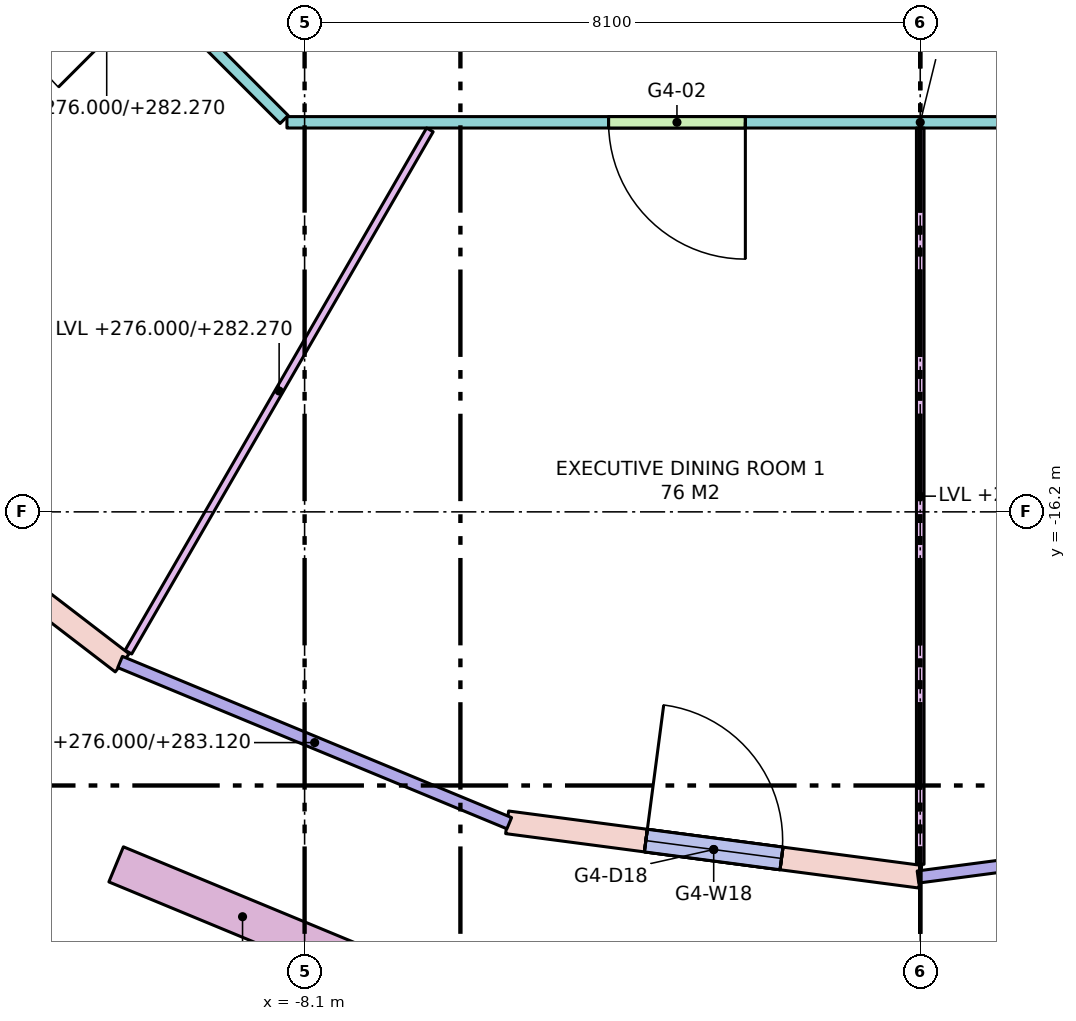
"""IFC4 building model, lengths in metres.
Left out: names, types, materials, properties, quantities, classifications, styles, units other than length and angle.
Written with IfcOpenShell. Run it as: python <this file> out.ifc"""

import sys

from ifc_helpers import new_model, si_unit, direction, frame, frame_2d, origin, place, context, subcontext, project, spatial, rectangle, extrude, element, fill, save


model = new_model("IFC4")
c1 = context("Model", 3, precision=1e-05, world=origin(), true_north=direction((0.0, 1.0)))
c2 = subcontext(c1, "Body", "Model", "MODEL_VIEW")
j1 = project(units=[si_unit("LENGTHUNIT", "METRE"), si_unit("PLANEANGLEUNIT", "RADIAN")], contexts=[c1])
p1 = place(None, origin())
s1 = spatial("IfcSite", under=j1, at=p1, CompositionType="ELEMENT")
p2 = place(p1, origin())
s2 = spatial("IfcBuilding", under=s1, at=p2, CompositionType="ELEMENT")
p3 = place(p2, frame((0.0, 0.0, 276.0)))
s3 = spatial("IfcBuildingStorey", under=s2, at=p3, CompositionType="ELEMENT", Elevation=276.0)
p4 = place(p3, frame((-14.849, -14.849, 0.0), z_axis=(0.0, 0.0, 1.0), x_axis=(0.793335336593, -0.608784891166, 0.0)))
e1 = element("IfcWall", 1, at=p4, inside=s3, PredefinedType="STANDARD", context=c2, shape_type="SweptSolid", body=[
    extrude(rectangle(XDim=5.482, YDim=0.3, at=frame_2d((2.741, 0.0))), origin(), (0.0, 0.0, 1.0), 7.12),
])
p5 = place(p4, frame((1.841, 0.0, 0.0)))
e2 = element("IfcOpeningElement", 2, at=p5, cuts=e1, PredefinedType="OPENING", context=c2, shape_type="SweptSolid", body=[
    extrude(rectangle(XDim=1.8, YDim=2.4, at=frame_2d((0.9, 1.2))), frame((0.0, 0.16, 0.0), z_axis=(0.0, -1.0, 0.0), x_axis=(1.0, 0.0, 0.0)), (0.0, 0.0, 1.0), 0.32),
])
p6 = place(p4, frame((1.841, 0.0, 2.8)))
e3 = element("IfcOpeningElement", 3, at=p6, cuts=e1, PredefinedType="OPENING", context=c2, shape_type="SweptSolid", body=[
    extrude(rectangle(XDim=1.8, YDim=4.1, at=frame_2d((0.9, 2.05))), frame((0.0, 0.16, 0.0), z_axis=(0.0, -1.0, 0.0), x_axis=(1.0, 0.0, 0.0)), (0.0, 0.0, 1.0), 0.32),
])
p7 = place(p3, frame((-5.435, -20.284, 0.0), z_axis=(0.0, 0.0, 1.0), x_axis=(0.991444743541, -0.130527087244, 0.0)))
e4 = element("IfcWall", 4, at=p7, inside=s3, PredefinedType="STANDARD", context=c2, shape_type="SweptSolid", body=[
    extrude(rectangle(XDim=5.482, YDim=0.3, at=frame_2d((2.741, 0.0))), origin(), (0.0, 0.0, 1.0), 7.12),
])
p8 = place(p7, frame((1.841, 0.0, 0.0)))
e5 = element("IfcOpeningElement", 5, at=p8, cuts=e4, PredefinedType="OPENING", context=c2, shape_type="SweptSolid", body=[
    extrude(rectangle(XDim=1.8, YDim=2.4, at=frame_2d((0.9, 1.2))), frame((0.0, 0.16, 0.0), z_axis=(0.0, -1.0, 0.0), x_axis=(1.0, 0.0, 0.0)), (0.0, 0.0, 1.0), 0.32),
])
p9 = place(p7, frame((1.841, 0.0, 2.8)))
e6 = element("IfcOpeningElement", 6, at=p9, cuts=e4, PredefinedType="OPENING", context=c2, shape_type="SweptSolid", body=[
    extrude(rectangle(XDim=1.8, YDim=4.1, at=frame_2d((0.9, 2.05))), frame((0.0, 0.16, 0.0), z_axis=(0.0, -1.0, 0.0), x_axis=(1.0, 0.0, 0.0)), (0.0, 0.0, 1.0), 0.32),
])
p10 = place(p3, frame((-10.58, -20.838, 0.0), z_axis=(0.0, 0.0, 1.0), x_axis=(0.923909393783, -0.382611332921, 0.0)))
e7 = element("IfcWall", 7, at=p10, inside=s3, PredefinedType="PARAPET", context=c2, shape_type="SweptSolid", body=[
    extrude(rectangle(XDim=3.6, YDim=0.5, at=frame_2d((1.8, 0.0))), origin(), (0.0, 0.0, 1.0), 0.9),
])
p11 = place(p3, frame((8.332, -11.075, 0.0), z_axis=(0.0, 0.0, 1.0), x_axis=(-1.0, 0.0, 0.0)))
e8 = element("IfcWall", 8, at=p11, inside=s3, PredefinedType="PARTITIONING", context=c2, shape_type="SweptSolid", body=[
    extrude(rectangle(XDim=16.665, YDim=0.15, at=frame_2d((8.332, 0.0))), origin(), (0.0, 0.0, 1.0), 6.27),
])
p12 = place(p11, frame((10.633, 0.0, 0.0)))
e9 = element("IfcOpeningElement", 9, at=p12, cuts=e8, PredefinedType="OPENING", context=c2, shape_type="SweptSolid", body=[
    extrude(rectangle(XDim=1.8, YDim=2.1, at=frame_2d((0.9, 1.05))), frame((0.0, 0.085, 0.0), z_axis=(0.0, -1.0, 0.0), x_axis=(1.0, 0.0, 0.0)), (0.0, 0.0, 1.0), 0.17),
])
p13 = place(p11, frame((6.398, 0.0, 0.0)))
e10 = element("IfcOpeningElement", 10, at=p13, cuts=e8, PredefinedType="OPENING", context=c2, shape_type="SweptSolid", body=[
    extrude(rectangle(XDim=0.9, YDim=2.1, at=frame_2d((0.45, 1.05))), frame((0.0, 0.085, 0.0), z_axis=(0.0, -1.0, 0.0), x_axis=(1.0, 0.0, 0.0)), (0.0, 0.0, 1.0), 0.17),
])
p14 = place(p11, frame((3.198, 0.0, 0.0)))
e11 = element("IfcOpeningElement", 11, at=p14, cuts=e8, PredefinedType="OPENING", context=c2, shape_type="SweptSolid", body=[
    extrude(rectangle(XDim=0.9, YDim=2.1, at=frame_2d((0.45, 1.05))), frame((0.0, 0.085, 0.0), z_axis=(0.0, -1.0, 0.0), x_axis=(1.0, 0.0, 0.0)), (0.0, 0.0, 1.0), 0.17),
])
p15 = place(p3, frame((-8.369, -11.038, 0.0), z_axis=(0.0, 0.0, 1.0), x_axis=(-0.707106781187, 0.707106781187, 0.0)))
e12 = element("IfcWall", 12, at=p15, inside=s3, PredefinedType="PARTITIONING", context=c2, shape_type="SweptSolid", body=[
    extrude(rectangle(XDim=6.602, YDim=0.15, at=frame_2d((3.301, 0.0))), origin(), (0.0, 0.0, 1.0), 6.27),
])
p16 = place(p15, frame((2.401, 0.0, 0.0)))
e13 = element("IfcOpeningElement", 13, at=p16, cuts=e12, PredefinedType="OPENING", context=c2, shape_type="SweptSolid", body=[
    extrude(rectangle(XDim=1.8, YDim=2.1, at=frame_2d((0.9, 1.05))), frame((0.0, 0.085, 0.0), z_axis=(0.0, -1.0, 0.0), x_axis=(1.0, 0.0, 0.0)), (0.0, 0.0, 1.0), 0.17),
])
p17 = place(p3, frame((-6.452, -11.175, 0.0), z_axis=(0.0, 0.0, 1.0), x_axis=(-0.50000481735, -0.866022622468, 0.0)))
e14 = element("IfcWall", 14, at=p17, inside=s3, PredefinedType="PARTITIONING", context=c2, shape_type="SweptSolid", body=[
    extrude(rectangle(XDim=7.934, YDim=0.1, at=frame_2d((3.967, 0.0))), origin(), (0.0, 0.0, 1.0), 6.27),
])
p18 = place(p3, frame((0.0, -11.15, 0.0), z_axis=(0.0, 0.0, 1.0), x_axis=(0.0, -1.0, 0.0)))
e15 = element("IfcWall", 15, at=p18, inside=s3, PredefinedType="PARTITIONING", context=c2, shape_type="SweptSolid", body=[
    extrude(rectangle(XDim=9.687, YDim=0.1, at=frame_2d((4.843, 0.0))), origin(), (0.0, 0.0, 1.0), 6.27),
])
p19 = place(p8, origin())
e16 = element("IfcDoor", 16, at=p19, inside=s3, OperationType="SINGLE_SWING_LEFT", PredefinedType="DOOR", context=c2, shape_type="SweptSolid", body=[
    extrude(rectangle(XDim=1.8, YDim=2.4, at=frame_2d((0.9, 1.2))), frame((0.0, 0.025, 0.0), z_axis=(0.0, -1.0, 0.0), x_axis=(1.0, 0.0, 0.0)), (0.0, 0.0, 1.0), 0.05),
])
fill(e5, e16)
p20 = place(p9, origin())
e17 = element("IfcWindow", 17, at=p20, inside=s3, PartitioningType="SINGLE_PANEL", PredefinedType="WINDOW", context=c2, shape_type="SweptSolid", body=[
    extrude(rectangle(XDim=1.8, YDim=4.1, at=frame_2d((0.9, 2.05))), frame((0.0, 0.03, 0.0), z_axis=(0.0, -1.0, 0.0), x_axis=(1.0, 0.0, 0.0)), (0.0, 0.0, 1.0), 0.06),
])
fill(e6, e17)
p21 = place(p12, origin())
e18 = element("IfcDoor", 18, at=p21, inside=s3, OperationType="DOUBLE_DOOR_SINGLE_SWING", PredefinedType="DOOR", context=c2, shape_type="SweptSolid", body=[
    extrude(rectangle(XDim=1.8, YDim=2.1, at=frame_2d((0.9, 1.05))), frame((0.0, 0.025, 0.0), z_axis=(0.0, -1.0, 0.0), x_axis=(1.0, 0.0, 0.0)), (0.0, 0.0, 1.0), 0.05),
])
fill(e9, e18)
save(model, sys.argv[1])
